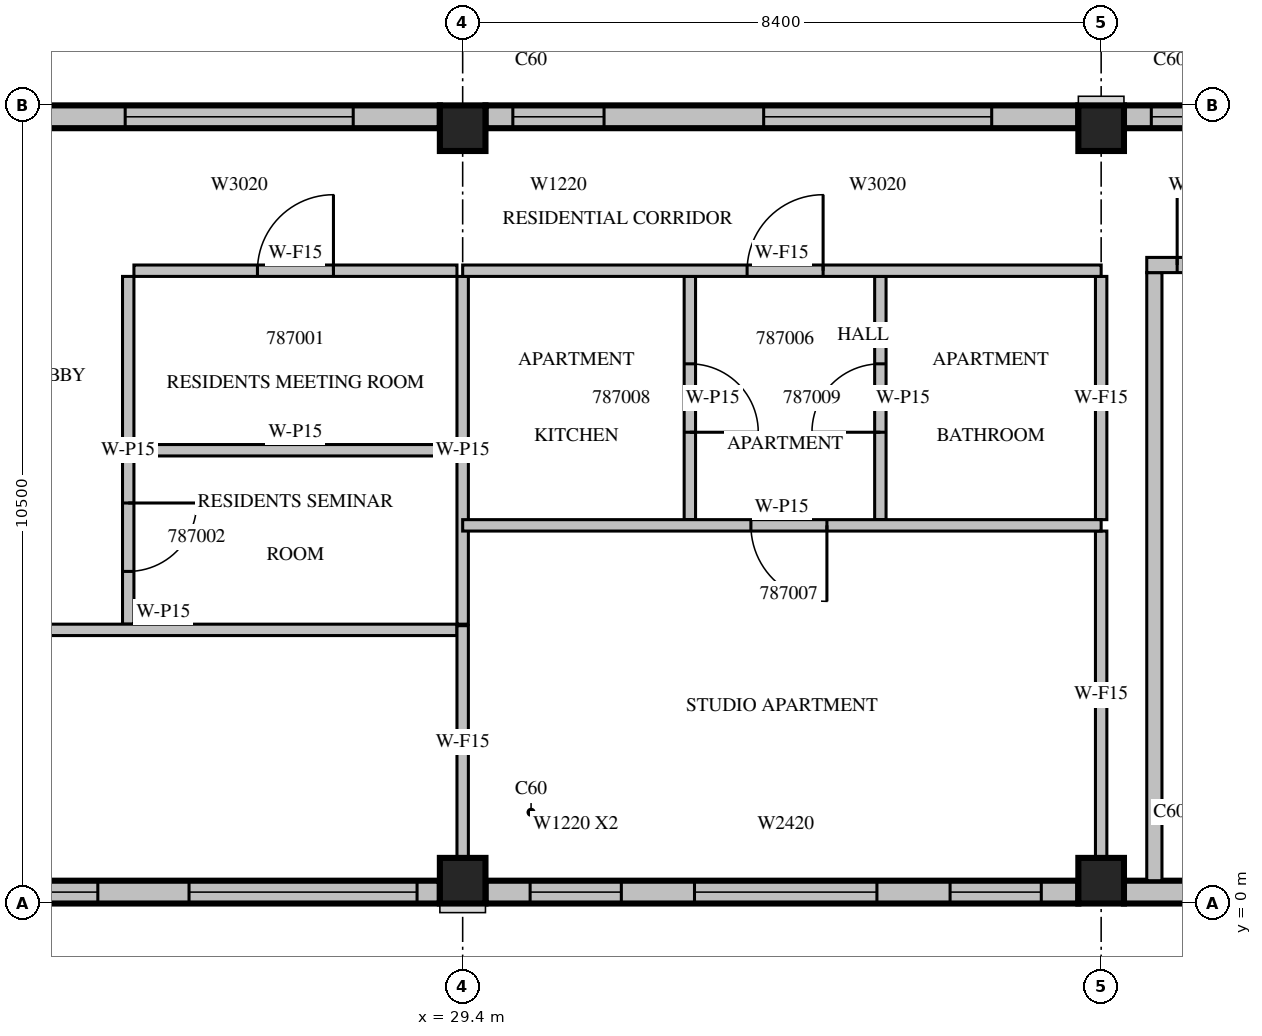
"""IFC4 building model, lengths in metres.
Left out: names, types, materials, properties, quantities, classifications, styles, units other than length and angle.
Written with IfcOpenShell. Run it as: python <this file> out.ifc"""

import sys

from ifc_helpers import new_model, si_unit, direction, frame, frame_2d, origin, origin_2d, place, context, subcontext, project, spatial, rectangle, extrude, source, transform, mapped, element, fill, save


model = new_model("IFC4")
c1 = context("Model", 3, precision=1e-05, world=origin(), true_north=direction((0.0, 1.0)))
c2 = subcontext(c1, "Body", "Model", "MODEL_VIEW")
j1 = project(units=[si_unit("LENGTHUNIT", "METRE"), si_unit("PLANEANGLEUNIT", "RADIAN")], contexts=[c1])
p1 = place(None, origin())
s1 = spatial("IfcSite", under=j1, at=p1, CompositionType="ELEMENT")
p2 = place(p1, origin())
s2 = spatial("IfcBuilding", under=s1, at=p2, CompositionType="ELEMENT")
p3 = place(p2, frame((0.0, 0.0, 365.0)))
s3 = spatial("IfcBuildingStorey", under=s2, at=p3, CompositionType="ELEMENT", Elevation=365.0)
m1 = source(origin(), c2, "Body", "SweptSolid", [
    extrude(rectangle(XDim=0.6, YDim=0.6, at=origin_2d()), origin(), (0.0, 0.0, 1.0), 3.5),
])
for number, where, z_axis, x_axis in (
    (1, (29.4, 0.3, 0.0), (0.0, 0.0, 1.0), (1.0, 0.0, 0.0)),
    (2, (37.8, 0.3, 0.0), (0.0, 0.0, 1.0), (1.0, 0.0, 0.0)),
    (3, (29.4, 10.2, 0.0), (0.0, 0.0, 1.0), (1.0, 0.0, 0.0)),
    (4, (37.8, 10.2, 0.0), (0.0, 0.0, 1.0), (1.0, 0.0, 0.0)),
):
    element("IfcColumn", number, at=place(p3, frame(where, z_axis=z_axis, x_axis=x_axis)), inside=s3, PredefinedType="COLUMN", context=c2, shape_type="MappedRepresentation", body=[
        mapped(m1, transform((0.0, 0.0, 0.0), scale=1.0)),
    ])
p4 = place(p3, frame((21.3, 0.15, 0.0), z_axis=(0.0, 0.0, 1.0), x_axis=(1.0, 0.0, 0.0)))
e5 = element("IfcWall", 5, at=p4, inside=s3, PredefinedType="STANDARD", context=c2, shape_type="SweptSolid", body=[
    extrude(rectangle(XDim=7.8, YDim=0.3, at=frame_2d((3.9, 0.0))), origin(), (0.0, 0.0, 1.0), 3.05),
])
m2 = source(origin(), c2, "Body", "SweptSolid", [
    extrude(rectangle(XDim=3.0, YDim=2.0, at=frame_2d((1.5, 1.0))), frame((0.0, 0.16, 0.0), z_axis=(0.0, -1.0, 0.0), x_axis=(1.0, 0.0, 0.0)), (0.0, 0.0, 1.0), 0.32),
])
p5 = place(p4, frame((0.3, 0.0, 0.6)))
e6 = element("IfcOpeningElement", 6, at=p5, cuts=e5, PredefinedType="OPENING", context=c2, shape_type="MappedRepresentation", body=[
    mapped(m2, transform((0.0, 0.0, 0.0), scale=1.0)),
])
p6 = place(p4, frame((4.5, 0.0, 0.6)))
e7 = element("IfcOpeningElement", 7, at=p6, cuts=e5, PredefinedType="OPENING", context=c2, shape_type="MappedRepresentation", body=[
    mapped(m2, transform((0.0, 0.0, 0.0), scale=1.0)),
])
m3 = source(origin(), c2, "Body", "SweptSolid", [
    extrude(rectangle(XDim=7.8, YDim=0.3, at=frame_2d((3.9, 0.0))), origin(), (0.0, 0.0, 1.0), 3.05),
])
p7 = place(p3, frame((29.7, 0.15, 0.0), z_axis=(0.0, 0.0, 1.0), x_axis=(1.0, 0.0, 0.0)))
e8 = element("IfcWall", 8, at=p7, inside=s3, PredefinedType="STANDARD", context=c2, shape_type="MappedRepresentation", body=[
    mapped(m3, transform((0.0, 0.0, 0.0), scale=1.0)),
])
m4 = source(origin(), c2, "Body", "SweptSolid", [
    extrude(rectangle(XDim=1.2, YDim=2.0, at=frame_2d((0.6, 1.0))), frame((0.0, 0.16, 0.0), z_axis=(0.0, -1.0, 0.0), x_axis=(1.0, 0.0, 0.0)), (0.0, 0.0, 1.0), 0.32),
])
p8 = place(p7, frame((0.588, 0.0, 0.6)))
e9 = element("IfcOpeningElement", 9, at=p8, cuts=e8, PredefinedType="OPENING", context=c2, shape_type="MappedRepresentation", body=[
    mapped(m4, transform((0.0, 0.0, 0.0), scale=1.0)),
])
p9 = place(p7, frame((6.112, 0.0, 0.6)))
e10 = element("IfcOpeningElement", 10, at=p9, cuts=e8, PredefinedType="OPENING", context=c2, shape_type="MappedRepresentation", body=[
    mapped(m4, transform((0.0, 0.0, 0.0), scale=1.0)),
])
m5 = source(origin(), c2, "Body", "SweptSolid", [
    extrude(rectangle(XDim=2.4, YDim=2.0, at=frame_2d((1.2, 1.0))), frame((0.0, 0.16, 0.0), z_axis=(0.0, -1.0, 0.0), x_axis=(1.0, 0.0, 0.0)), (0.0, 0.0, 1.0), 0.32),
])
p10 = place(p7, frame((2.75, 0.0, 0.6)))
e11 = element("IfcOpeningElement", 11, at=p10, cuts=e8, PredefinedType="OPENING", context=c2, shape_type="MappedRepresentation", body=[
    mapped(m5, transform((0.0, 0.0, 0.0), scale=1.0)),
])
p11 = place(p3, frame((38.1, 0.15, 0.0), z_axis=(0.0, 0.0, 1.0), x_axis=(1.0, 0.0, 0.0)))
e12 = element("IfcWall", 12, at=p11, inside=s3, PredefinedType="STANDARD", context=c2, shape_type="SweptSolid", body=[
    extrude(rectangle(XDim=2.1, YDim=0.3, at=frame_2d((1.05, 0.0))), origin(), (0.0, 0.0, 1.0), 3.05),
])
p12 = place(p3, frame((45.9, 10.35, 0.0), z_axis=(0.0, 0.0, 1.0), x_axis=(-1.0, 0.0, 0.0)))
e13 = element("IfcWall", 13, at=p12, inside=s3, PredefinedType="STANDARD", context=c2, shape_type="MappedRepresentation", body=[
    mapped(m3, transform((0.0, 0.0, 0.0), scale=1.0)),
])
p13 = place(p12, frame((1.14, 0.0, 0.6)))
e14 = element("IfcOpeningElement", 14, at=p13, cuts=e13, PredefinedType="OPENING", context=c2, shape_type="MappedRepresentation", body=[
    mapped(m2, transform((0.0, 0.0, 0.0), scale=1.0)),
])
p14 = place(p12, frame((6.24, 0.0, 0.6)))
e15 = element("IfcOpeningElement", 15, at=p14, cuts=e13, PredefinedType="OPENING", context=c2, shape_type="MappedRepresentation", body=[
    mapped(m4, transform((0.0, 0.0, 0.0), scale=1.0)),
])
p15 = place(p3, frame((37.5, 10.35, 0.0), z_axis=(0.0, 0.0, 1.0), x_axis=(-1.0, 0.0, 0.0)))
e16 = element("IfcWall", 16, at=p15, inside=s3, PredefinedType="STANDARD", context=c2, shape_type="MappedRepresentation", body=[
    mapped(m3, transform((0.0, 0.0, 0.0), scale=1.0)),
])
p16 = place(p15, frame((1.14, 0.0, 0.6)))
e17 = element("IfcOpeningElement", 17, at=p16, cuts=e16, PredefinedType="OPENING", context=c2, shape_type="MappedRepresentation", body=[
    mapped(m2, transform((0.0, 0.0, 0.0), scale=1.0)),
])
p17 = place(p15, frame((6.24, 0.0, 0.6)))
e18 = element("IfcOpeningElement", 18, at=p17, cuts=e16, PredefinedType="OPENING", context=c2, shape_type="MappedRepresentation", body=[
    mapped(m4, transform((0.0, 0.0, 0.0), scale=1.0)),
])
p18 = place(p3, frame((29.1, 10.35, 0.0), z_axis=(0.0, 0.0, 1.0), x_axis=(-1.0, 0.0, 0.0)))
e19 = element("IfcWall", 19, at=p18, inside=s3, PredefinedType="STANDARD", context=c2, shape_type="SweptSolid", body=[
    extrude(rectangle(XDim=7.5, YDim=0.3, at=frame_2d((3.75, 0.0))), origin(), (0.0, 0.0, 1.0), 3.05),
])
p19 = place(p18, frame((1.14, 0.0, 0.6)))
e20 = element("IfcOpeningElement", 20, at=p19, cuts=e19, PredefinedType="OPENING", context=c2, shape_type="MappedRepresentation", body=[
    mapped(m2, transform((0.0, 0.0, 0.0), scale=1.0)),
])
m6 = source(origin(), c2, "Body", "SweptSolid", [
    extrude(rectangle(XDim=1.8, YDim=2.0, at=frame_2d((0.9, 1.0))), frame((0.0, 0.16, 0.0), z_axis=(0.0, -1.0, 0.0), x_axis=(1.0, 0.0, 0.0)), (0.0, 0.0, 1.0), 0.32),
])
p20 = place(p18, frame((5.52, 0.0, 0.6)))
e21 = element("IfcOpeningElement", 21, at=p20, cuts=e19, PredefinedType="OPENING", context=c2, shape_type="MappedRepresentation", body=[
    mapped(m6, transform((0.0, 0.0, 0.0), scale=1.0)),
])
p21 = place(p3, frame((38.5, 0.3, 0.0), z_axis=(0.0, 0.0, 1.0), x_axis=(0.0, 1.0, 0.0)))
e22 = element("IfcWall", 22, at=p21, inside=s3, PredefinedType="PARTITIONING", context=c2, shape_type="SweptSolid", body=[
    extrude(rectangle(XDim=8.0, YDim=0.2, at=frame_2d((4.0, 0.0))), origin(), (0.0, 0.0, 1.0), 3.05),
])
p22 = place(p3, frame((38.4, 8.4, 0.0), z_axis=(0.0, 0.0, 1.0), x_axis=(1.0, 0.0, 0.0)))
e23 = element("IfcWall", 23, at=p22, inside=s3, PredefinedType="PARTITIONING", context=c2, shape_type="SweptSolid", body=[
    extrude(rectangle(XDim=5.45, YDim=0.2, at=frame_2d((2.725, 0.0))), origin(), (0.0, 0.0, 1.0), 3.05),
])
m7 = source(origin(), c2, "Body", "SweptSolid", [
    extrude(rectangle(XDim=1.2, YDim=2.1, at=frame_2d((0.6, 1.05))), frame((0.0, 0.11, 0.0), z_axis=(0.0, -1.0, 0.0), x_axis=(1.0, 0.0, 0.0)), (0.0, 0.0, 1.0), 0.22),
])
p23 = place(p22, frame((0.4, 0.0, 0.0)))
e24 = element("IfcOpeningElement", 24, at=p23, cuts=e23, PredefinedType="OPENING", context=c2, shape_type="MappedRepresentation", body=[
    mapped(m7, transform((0.0, 0.0, 0.0), scale=1.0)),
])
m8 = source(origin(), c2, "Body", "SweptSolid", [
    extrude(rectangle(XDim=0.9, YDim=2.1, at=frame_2d((0.45, 1.05))), frame((0.0, 0.11, 0.0), z_axis=(0.0, -1.0, 0.0), x_axis=(1.0, 0.0, 0.0)), (0.0, 0.0, 1.0), 0.22),
])
p24 = place(p22, frame((3.25, 0.0, 0.0)))
e25 = element("IfcOpeningElement", 25, at=p24, cuts=e23, PredefinedType="OPENING", context=c2, shape_type="MappedRepresentation", body=[
    mapped(m8, transform((0.0, 0.0, 0.0), scale=1.0)),
])
p25 = place(p3, frame((25.0, 8.25, 0.0), z_axis=(0.0, 0.0, 1.0), x_axis=(0.0, -1.0, 0.0)))
e26 = element("IfcWall", 26, at=p25, inside=s3, PredefinedType="PARTITIONING", context=c2, shape_type="SweptSolid", body=[
    extrude(rectangle(XDim=4.575, YDim=0.15, at=frame_2d((2.288, 0.0))), origin(), (0.0, 0.0, 1.0), 3.05),
])
m9 = source(origin(), c2, "Body", "SweptSolid", [
    extrude(rectangle(XDim=0.9, YDim=2.1, at=frame_2d((0.45, 1.05))), frame((0.0, 0.085, 0.0), z_axis=(0.0, -1.0, 0.0), x_axis=(1.0, 0.0, 0.0)), (0.0, 0.0, 1.0), 0.17),
])
p26 = place(p25, frame((2.981, 0.0, 0.0)))
e27 = element("IfcOpeningElement", 27, at=p26, cuts=e26, PredefinedType="OPENING", context=c2, shape_type="MappedRepresentation", body=[
    mapped(m9, transform((0.0, 0.0, 0.0), scale=1.0)),
])
m10 = source(origin(), c2, "Body", "SweptSolid", [
    extrude(rectangle(XDim=4.575, YDim=0.15, at=frame_2d((2.288, 0.0))), origin(), (0.0, 0.0, 1.0), 3.05),
])
p27 = place(p3, frame((29.4, 3.675, 0.0), z_axis=(0.0, 0.0, 1.0), x_axis=(0.0, 1.0, 0.0)))
e28 = element("IfcWall", 28, at=p27, inside=s3, PredefinedType="PARTITIONING", context=c2, shape_type="MappedRepresentation", body=[
    mapped(m10, transform((0.0, 0.0, 0.0), scale=1.0)),
])
p28 = place(p3, frame((29.325, 8.325, 0.0), z_axis=(0.0, 0.0, 1.0), x_axis=(-1.0, 0.0, 0.0)))
e29 = element("IfcWall", 29, at=p28, inside=s3, PredefinedType="PARTITIONING", context=c2, shape_type="SweptSolid", body=[
    extrude(rectangle(XDim=4.25, YDim=0.15, at=frame_2d((2.125, 0.0))), origin(), (0.0, 0.0, 1.0), 3.05),
])
m11 = source(origin(), c2, "Body", "SweptSolid", [
    extrude(rectangle(XDim=1.0, YDim=2.1, at=frame_2d((0.5, 1.05))), frame((0.0, 0.085, 0.0), z_axis=(0.0, -1.0, 0.0), x_axis=(1.0, 0.0, 0.0)), (0.0, 0.0, 1.0), 0.17),
])
p29 = place(p28, frame((1.625, 0.0, 0.0)))
e30 = element("IfcOpeningElement", 30, at=p29, cuts=e29, PredefinedType="OPENING", context=c2, shape_type="MappedRepresentation", body=[
    mapped(m11, transform((0.0, 0.0, 0.0), scale=1.0)),
])
m12 = source(origin(), c2, "Body", "SweptSolid", [
    extrude(rectangle(XDim=4.25, YDim=0.15, at=frame_2d((2.125, 0.0))), origin(), (0.0, 0.0, 1.0), 3.05),
])
p30 = place(p3, frame((29.325, 5.963, 0.0), z_axis=(0.0, 0.0, 1.0), x_axis=(-1.0, 0.0, 0.0)))
e31 = element("IfcWall", 31, at=p30, inside=s3, PredefinedType="PARTITIONING", context=c2, shape_type="MappedRepresentation", body=[
    mapped(m12, transform((0.0, 0.0, 0.0), scale=1.0)),
])
p31 = place(p3, frame((21.6, 3.6, 0.0), z_axis=(0.0, 0.0, 1.0), x_axis=(1.0, 0.0, 0.0)))
e32 = element("IfcWall", 32, at=p31, inside=s3, PredefinedType="PARTITIONING", context=c2, shape_type="SweptSolid", body=[
    extrude(rectangle(XDim=7.725, YDim=0.15, at=frame_2d((3.862, 0.0))), origin(), (0.0, 0.0, 1.0), 3.05),
])
m13 = source(origin(), c2, "Body", "SweptSolid", [
    extrude(rectangle(XDim=1.2, YDim=2.1, at=frame_2d((0.6, 1.05))), frame((0.0, 0.085, 0.0), z_axis=(0.0, -1.0, 0.0), x_axis=(1.0, 0.0, 0.0)), (0.0, 0.0, 1.0), 0.17),
])
p32 = place(p31, frame((1.1, 0.0, 0.0)))
e33 = element("IfcOpeningElement", 33, at=p32, cuts=e32, PredefinedType="OPENING", context=c2, shape_type="MappedRepresentation", body=[
    mapped(m13, transform((0.0, 0.0, 0.0), scale=1.0)),
])
p33 = place(p3, frame((32.389, 5.05, 0.0), z_axis=(0.0, 0.0, 1.0), x_axis=(0.0, 1.0, 0.0)))
e34 = element("IfcWall", 34, at=p33, inside=s3, PredefinedType="PARTITIONING", context=c2, shape_type="SweptSolid", body=[
    extrude(rectangle(XDim=3.2, YDim=0.15, at=frame_2d((1.6, 0.0))), origin(), (0.0, 0.0, 1.0), 3.05),
])
p34 = place(p33, frame((1.15, 0.0, 0.0)))
e35 = element("IfcOpeningElement", 35, at=p34, cuts=e34, PredefinedType="OPENING", context=c2, shape_type="MappedRepresentation", body=[
    mapped(m9, transform((0.0, 0.0, 0.0), scale=1.0)),
])
m14 = source(origin(), c2, "Body", "SweptSolid", [
    extrude(rectangle(XDim=3.2, YDim=0.15, at=frame_2d((1.6, 0.0))), origin(), (0.0, 0.0, 1.0), 3.05),
])
p35 = place(p3, frame((34.895, 5.05, 0.0), z_axis=(0.0, 0.0, 1.0), x_axis=(0.0, 1.0, 0.0)))
e36 = element("IfcWall", 36, at=p35, inside=s3, PredefinedType="PARTITIONING", context=c2, shape_type="MappedRepresentation", body=[
    mapped(m14, transform((0.0, 0.0, 0.0), scale=1.0)),
])
p36 = place(p35, frame((1.15, 0.0, 0.0)))
e37 = element("IfcOpeningElement", 37, at=p36, cuts=e36, PredefinedType="OPENING", context=c2, shape_type="MappedRepresentation", body=[
    mapped(m9, transform((0.0, 0.0, 0.0), scale=1.0)),
])
p37 = place(p3, frame((29.4, 0.599, 0.0), z_axis=(0.0, 0.0, 1.0), x_axis=(0.0, 1.0, 0.0)))
e38 = element("IfcWall", 38, at=p37, inside=s3, PredefinedType="PARTITIONING", context=c2, shape_type="SweptSolid", body=[
    extrude(rectangle(XDim=3.056, YDim=0.15, at=frame_2d((1.528, 0.0))), origin(), (0.0, 0.0, 1.0), 3.05),
])
p38 = place(p3, frame((37.8, 0.599, 0.0), z_axis=(0.0, 0.0, 1.0), x_axis=(0.0, 1.0, 0.0)))
e39 = element("IfcWall", 39, at=p38, inside=s3, PredefinedType="PARTITIONING", context=c2, shape_type="SweptSolid", body=[
    extrude(rectangle(XDim=4.301, YDim=0.15, at=frame_2d((2.151, 0.0))), origin(), (0.0, 0.0, 1.0), 3.05),
])
p39 = place(p3, frame((37.8, 5.05, 0.0), z_axis=(0.0, 0.0, 1.0), x_axis=(0.0, 1.0, 0.0)))
e40 = element("IfcWall", 40, at=p39, inside=s3, PredefinedType="PARTITIONING", context=c2, shape_type="MappedRepresentation", body=[
    mapped(m14, transform((0.0, 0.0, 0.0), scale=1.0)),
])
p40 = place(p3, frame((37.8, 4.975, 0.0), z_axis=(0.0, 0.0, 1.0), x_axis=(-1.0, 0.0, 0.0)))
e41 = element("IfcWall", 41, at=p40, inside=s3, PredefinedType="PARTITIONING", context=c2, shape_type="SweptSolid", body=[
    extrude(rectangle(XDim=8.4, YDim=0.15, at=frame_2d((4.2, 0.0))), origin(), (0.0, 0.0, 1.0), 3.05),
])
p41 = place(p40, frame((3.608, 0.0, 0.0)))
e42 = element("IfcOpeningElement", 42, at=p41, cuts=e41, PredefinedType="OPENING", context=c2, shape_type="MappedRepresentation", body=[
    mapped(m11, transform((0.0, 0.0, 0.0), scale=1.0)),
])
m15 = source(origin(), c2, "Body", "SweptSolid", [
    extrude(rectangle(XDim=8.4, YDim=0.15, at=frame_2d((4.2, 0.0))), origin(), (0.0, 0.0, 1.0), 3.05),
])
p42 = place(p3, frame((37.8, 8.325, 0.0), z_axis=(0.0, 0.0, 1.0), x_axis=(-1.0, 0.0, 0.0)))
e43 = element("IfcWall", 43, at=p42, inside=s3, PredefinedType="PARTITIONING", context=c2, shape_type="MappedRepresentation", body=[
    mapped(m15, transform((0.0, 0.0, 0.0), scale=1.0)),
])
p43 = place(p42, frame((3.658, 0.0, 0.0)))
e44 = element("IfcOpeningElement", 44, at=p43, cuts=e43, PredefinedType="OPENING", context=c2, shape_type="MappedRepresentation", body=[
    mapped(m11, transform((0.0, 0.0, 0.0), scale=1.0)),
])
m16 = source(origin(), c2, "Body", "SweptSolid", [
    extrude(rectangle(XDim=3.0, YDim=2.0, at=frame_2d((1.5, 1.0))), frame((0.0, 0.03, 0.0), z_axis=(0.0, -1.0, 0.0), x_axis=(1.0, 0.0, 0.0)), (0.0, 0.0, 1.0), 0.06),
])
p44 = place(p5, origin())
e45 = element("IfcWindow", 45, at=p44, inside=s3, PartitioningType="SINGLE_PANEL", PredefinedType="WINDOW", context=c2, shape_type="MappedRepresentation", body=[
    mapped(m16, transform((0.0, 0.0, 0.0), scale=1.0)),
])
fill(e6, e45)
p45 = place(p6, origin())
e46 = element("IfcWindow", 46, at=p45, inside=s3, PartitioningType="SINGLE_PANEL", PredefinedType="WINDOW", context=c2, shape_type="MappedRepresentation", body=[
    mapped(m16, transform((0.0, 0.0, 0.0), scale=1.0)),
])
fill(e7, e46)
m17 = source(origin(), c2, "Body", "SweptSolid", [
    extrude(rectangle(XDim=1.2, YDim=2.0, at=frame_2d((0.6, 1.0))), frame((0.0, 0.03, 0.0), z_axis=(0.0, -1.0, 0.0), x_axis=(1.0, 0.0, 0.0)), (0.0, 0.0, 1.0), 0.06),
])
p46 = place(p8, origin())
e47 = element("IfcWindow", 47, at=p46, inside=s3, PartitioningType="SINGLE_PANEL", PredefinedType="WINDOW", context=c2, shape_type="MappedRepresentation", body=[
    mapped(m17, transform((0.0, 0.0, 0.0), scale=1.0)),
])
fill(e9, e47)
p47 = place(p9, origin())
e48 = element("IfcWindow", 48, at=p47, inside=s3, PartitioningType="SINGLE_PANEL", PredefinedType="WINDOW", context=c2, shape_type="MappedRepresentation", body=[
    mapped(m17, transform((0.0, 0.0, 0.0), scale=1.0)),
])
fill(e10, e48)
m18 = source(origin(), c2, "Body", "SweptSolid", [
    extrude(rectangle(XDim=2.4, YDim=2.0, at=frame_2d((1.2, 1.0))), frame((0.0, 0.03, 0.0), z_axis=(0.0, -1.0, 0.0), x_axis=(1.0, 0.0, 0.0)), (0.0, 0.0, 1.0), 0.06),
])
p48 = place(p10, origin())
e49 = element("IfcWindow", 49, at=p48, inside=s3, PartitioningType="SINGLE_PANEL", PredefinedType="WINDOW", context=c2, shape_type="MappedRepresentation", body=[
    mapped(m18, transform((0.0, 0.0, 0.0), scale=1.0)),
])
fill(e11, e49)
p49 = place(p14, origin())
e50 = element("IfcWindow", 50, at=p49, inside=s3, PartitioningType="SINGLE_PANEL", PredefinedType="WINDOW", context=c2, shape_type="MappedRepresentation", body=[
    mapped(m17, transform((0.0, 0.0, 0.0), scale=1.0)),
])
fill(e15, e50)
p50 = place(p16, origin())
e51 = element("IfcWindow", 51, at=p50, inside=s3, PartitioningType="SINGLE_PANEL", PredefinedType="WINDOW", context=c2, shape_type="MappedRepresentation", body=[
    mapped(m16, transform((0.0, 0.0, 0.0), scale=1.0)),
])
fill(e17, e51)
p51 = place(p17, origin())
e52 = element("IfcWindow", 52, at=p51, inside=s3, PartitioningType="SINGLE_PANEL", PredefinedType="WINDOW", context=c2, shape_type="MappedRepresentation", body=[
    mapped(m17, transform((0.0, 0.0, 0.0), scale=1.0)),
])
fill(e18, e52)
p52 = place(p19, origin())
e53 = element("IfcWindow", 53, at=p52, inside=s3, PartitioningType="SINGLE_PANEL", PredefinedType="WINDOW", context=c2, shape_type="MappedRepresentation", body=[
    mapped(m16, transform((0.0, 0.0, 0.0), scale=1.0)),
])
fill(e20, e53)
m19 = source(origin(), c2, "Body", "SweptSolid", [
    extrude(rectangle(XDim=1.2, YDim=2.1, at=frame_2d((0.6, 1.05))), frame((0.0, 0.025, 0.0), z_axis=(0.0, -1.0, 0.0), x_axis=(1.0, 0.0, 0.0)), (0.0, 0.0, 1.0), 0.05),
])
p53 = place(p23, origin())
e54 = element("IfcDoor", 54, at=p53, inside=s3, OperationType="SINGLE_SWING_LEFT", PredefinedType="DOOR", context=c2, shape_type="MappedRepresentation", body=[
    mapped(m19, transform((0.0, 0.0, 0.0), scale=1.0)),
])
fill(e24, e54)
m20 = source(origin(), c2, "Body", "SweptSolid", [
    extrude(rectangle(XDim=1.0, YDim=2.1, at=frame_2d((0.5, 1.05))), frame((0.0, 0.025, 0.0), z_axis=(0.0, -1.0, 0.0), x_axis=(1.0, 0.0, 0.0)), (0.0, 0.0, 1.0), 0.05),
])
p54 = place(p29, origin())
e55 = element("IfcDoor", 55, at=p54, inside=s3, OperationType="SINGLE_SWING_RIGHT", PredefinedType="DOOR", context=c2, shape_type="MappedRepresentation", body=[
    mapped(m20, transform((0.0, 0.0, 0.0), scale=1.0)),
])
fill(e30, e55)
m21 = source(origin(), c2, "Body", "SweptSolid", [
    extrude(rectangle(XDim=0.9, YDim=2.1, at=frame_2d((0.45, 1.05))), frame((0.0, 0.025, 0.0), z_axis=(0.0, -1.0, 0.0), x_axis=(1.0, 0.0, 0.0)), (0.0, 0.0, 1.0), 0.05),
])
p55 = place(p26, origin())
e56 = element("IfcDoor", 56, at=p55, inside=s3, OperationType="SINGLE_SWING_LEFT", PredefinedType="DOOR", context=c2, shape_type="MappedRepresentation", body=[
    mapped(m21, transform((0.0, 0.0, 0.0), scale=1.0)),
])
fill(e27, e56)
p56 = place(p43, origin())
e57 = element("IfcDoor", 57, at=p56, inside=s3, OperationType="SINGLE_SWING_RIGHT", PredefinedType="DOOR", context=c2, shape_type="MappedRepresentation", body=[
    mapped(m20, transform((0.0, 0.0, 0.0), scale=1.0)),
])
fill(e44, e57)
p57 = place(p41, origin())
e58 = element("IfcDoor", 58, at=p57, inside=s3, OperationType="SINGLE_SWING_LEFT", PredefinedType="DOOR", context=c2, shape_type="MappedRepresentation", body=[
    mapped(m20, transform((0.0, 0.0, 0.0), scale=1.0)),
])
fill(e42, e58)
p58 = place(p34, origin())
e59 = element("IfcDoor", 59, at=p58, inside=s3, OperationType="SINGLE_SWING_RIGHT", PredefinedType="DOOR", context=c2, shape_type="MappedRepresentation", body=[
    mapped(m21, transform((0.0, 0.0, 0.0), scale=1.0)),
])
fill(e35, e59)
p59 = place(p36, origin())
e60 = element("IfcDoor", 60, at=p59, inside=s3, OperationType="SINGLE_SWING_LEFT", PredefinedType="DOOR", context=c2, shape_type="MappedRepresentation", body=[
    mapped(m21, transform((0.0, 0.0, 0.0), scale=1.0)),
])
fill(e37, e60)
save(model, sys.argv[1])
